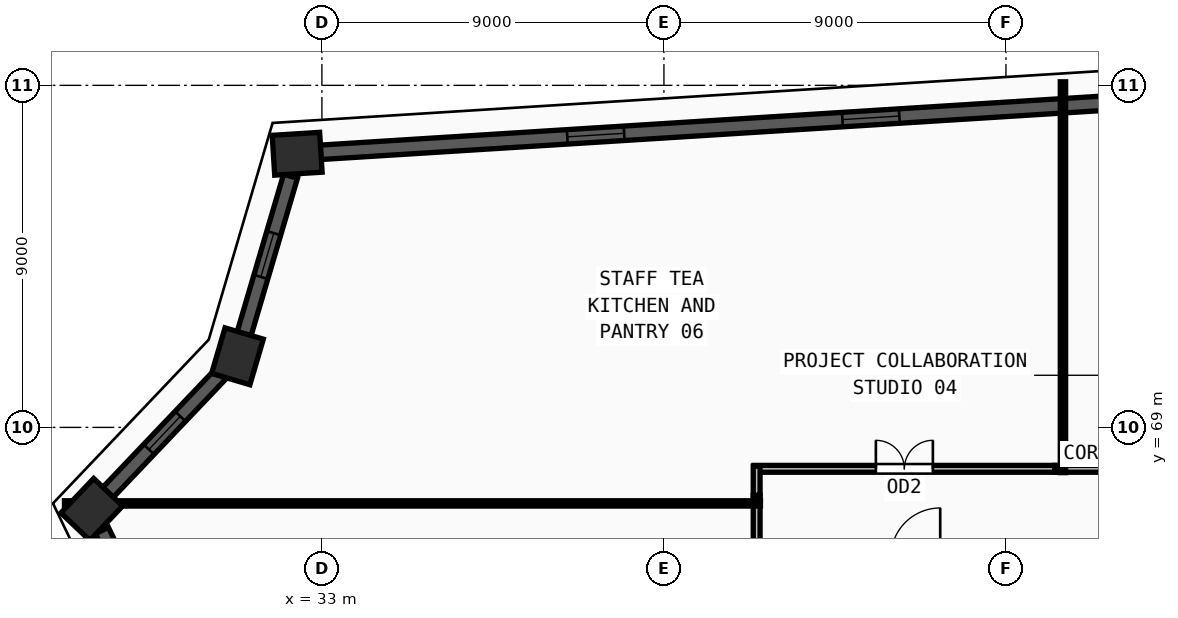
"""IFC4 building model, lengths in metres.
Left out: names, types, materials, properties, quantities, classifications, styles, units other than length and angle.
Written with IfcOpenShell. Run it as: python <this file> out.ifc"""

import sys

from ifc_helpers import new_model, si_unit, direction, frame, frame_2d, origin, origin_2d, place, context, subcontext, project, spatial, rectangle, extrude, source, transform, mapped, element, fill, save


model = new_model("IFC4")
c1 = context("Model", 3, precision=1e-05, world=origin(), true_north=direction((0.0, 1.0)))
c2 = subcontext(c1, "Body", "Model", "MODEL_VIEW")
j1 = project(units=[si_unit("LENGTHUNIT", "METRE"), si_unit("PLANEANGLEUNIT", "RADIAN")], contexts=[c1])
p1 = place(None, origin())
s1 = spatial("IfcSite", under=j1, at=p1, CompositionType="ELEMENT")
p2 = place(p1, origin())
s2 = spatial("IfcBuilding", under=s1, at=p2, CompositionType="ELEMENT")
p3 = place(p2, frame((0.0, 0.0, 224.25)))
s3 = spatial("IfcBuildingStorey", under=s2, at=p3, CompositionType="ELEMENT", Elevation=224.25)
m1 = source(origin(), c2, "Body", "SweptSolid", [
    extrude(rectangle(XDim=1.25, YDim=1.05, at=origin_2d()), origin(), (0.0, 0.0, 1.0), 3.75),
])
for number, where, z_axis, x_axis in (
    (1, (26.944, 66.841, 0.0), (0.0, 0.0, 1.0), (0.689, 0.724, 0.0)),
    (2, (30.778, 70.871, 0.0), (0.0, 0.0, 1.0), (0.283, 0.959, 0.0)),
    (3, (32.349, 76.2, 0.0), (0.0, 0.0, 1.0), (0.998, 0.062, 0.0)),
):
    element("IfcColumn", number, at=place(p3, frame(where, z_axis=z_axis, x_axis=x_axis)), inside=s3, PredefinedType="COLUMN", context=c2, shape_type="MappedRepresentation", body=[
        mapped(m1, transform((0.0, 0.0, 0.0), x_axis=(1.0, 0.0, 0.0), y_axis=(0.0, 1.0, 0.0), z_axis=(0.0, 0.0, 1.0), scale=1.0)),
    ])
p4 = place(p3, frame((61.928, 78.053, 0.0), z_axis=(0.0, 0.0, 1.0), x_axis=(-0.998042647874, -0.062536973258, 0.0)))
e4 = element("IfcWall", 4, at=p4, inside=s3, PredefinedType="SOLIDWALL", context=c2, shape_type="SweptSolid", body=[
    extrude(rectangle(XDim=29.022, YDim=0.38, at=frame_2d((14.511, 0.0))), origin(), (0.0, 0.0, 1.0), 3.57),
])
m2 = source(origin(), c2, "Body", "SweptSolid", [
    extrude(rectangle(XDim=1.5, YDim=1.9, at=frame_2d((0.75, 0.95))), frame((0.0, 0.2, 0.0), z_axis=(0.0, -1.0, 0.0), x_axis=(1.0, 0.0, 0.0)), (0.0, 0.0, 1.0), 0.4),
])
p5 = place(p4, frame((6.505, 0.0, 0.55)))
e5 = element("IfcOpeningElement", 5, at=p5, cuts=e4, PredefinedType="OPENING", context=c2, shape_type="MappedRepresentation", body=[
    mapped(m2, transform((0.0, 0.0, 0.0), x_axis=(1.0, 0.0, 0.0), y_axis=(0.0, 1.0, 0.0), z_axis=(0.0, 0.0, 1.0), scale=1.0)),
])
p6 = place(p4, frame((13.761, 0.0, 0.55)))
e6 = element("IfcOpeningElement", 6, at=p6, cuts=e4, PredefinedType="OPENING", context=c2, shape_type="MappedRepresentation", body=[
    mapped(m2, transform((0.0, 0.0, 0.0), x_axis=(1.0, 0.0, 0.0), y_axis=(0.0, 1.0, 0.0), z_axis=(0.0, 0.0, 1.0), scale=1.0)),
])
p7 = place(p4, frame((21.016, 0.0, 0.55)))
e7 = element("IfcOpeningElement", 7, at=p7, cuts=e4, PredefinedType="OPENING", context=c2, shape_type="MappedRepresentation", body=[
    mapped(m2, transform((0.0, 0.0, 0.0), x_axis=(1.0, 0.0, 0.0), y_axis=(0.0, 1.0, 0.0), z_axis=(0.0, 0.0, 1.0), scale=1.0)),
])
p8 = place(p3, frame((32.175, 75.61, 0.0), z_axis=(0.0, 0.0, 1.0), x_axis=(-0.282762120178, -0.959190066354, 0.0)))
e8 = element("IfcWall", 8, at=p8, inside=s3, PredefinedType="SOLIDWALL", context=c2, shape_type="SweptSolid", body=[
    extrude(rectangle(XDim=4.326, YDim=0.38, at=frame_2d((2.163, 0.0))), origin(), (0.0, 0.0, 1.0), 3.57),
])
m3 = source(origin(), c2, "Body", "SweptSolid", [
    extrude(rectangle(XDim=1.2, YDim=1.9, at=frame_2d((0.6, 0.95))), frame((0.0, 0.2, 0.0), z_axis=(0.0, -1.0, 0.0), x_axis=(1.0, 0.0, 0.0)), (0.0, 0.0, 1.0), 0.4),
])
p9 = place(p8, frame((1.563, 0.0, 0.55)))
e9 = element("IfcOpeningElement", 9, at=p9, cuts=e8, PredefinedType="OPENING", context=c2, shape_type="MappedRepresentation", body=[
    mapped(m3, transform((0.0, 0.0, 0.0), x_axis=(1.0, 0.0, 0.0), y_axis=(0.0, 1.0, 0.0), z_axis=(0.0, 0.0, 1.0), scale=1.0)),
])
p10 = place(p3, frame((30.354, 70.425, 0.0), z_axis=(0.0, 0.0, 1.0), x_axis=(-0.689360975367, -0.724418004774, 0.0)))
e10 = element("IfcWall", 10, at=p10, inside=s3, PredefinedType="SOLIDWALL", context=c2, shape_type="SweptSolid", body=[
    extrude(rectangle(XDim=4.332, YDim=0.38, at=frame_2d((2.166, 0.0))), origin(), (0.0, 0.0, 1.0), 3.57),
])
p11 = place(p10, frame((1.566, 0.0, 0.55)))
e11 = element("IfcOpeningElement", 11, at=p11, cuts=e10, PredefinedType="OPENING", context=c2, shape_type="MappedRepresentation", body=[
    mapped(m3, transform((0.0, 0.0, 0.0), x_axis=(1.0, 0.0, 0.0), y_axis=(0.0, 1.0, 0.0), z_axis=(0.0, 0.0, 1.0), scale=1.0)),
])
p12 = place(p3, frame((27.211, 66.287, 0.0), z_axis=(0.0, 0.0, 1.0), x_axis=(0.433730710757, -0.901042546469, 0.0)))
e12 = element("IfcWall", 12, at=p12, inside=s3, PredefinedType="SOLIDWALL", context=c2, shape_type="SweptSolid", body=[
    extrude(rectangle(XDim=23.948, YDim=0.38, at=frame_2d((11.974, 0.0))), origin(), (0.0, 0.0, 1.0), 3.57),
])
p13 = place(p12, frame((5.237, 0.0, 0.55)))
e13 = element("IfcOpeningElement", 13, at=p13, cuts=e12, PredefinedType="OPENING", context=c2, shape_type="MappedRepresentation", body=[
    mapped(m2, transform((0.0, 0.0, 0.0), x_axis=(1.0, 0.0, 0.0), y_axis=(0.0, 1.0, 0.0), z_axis=(0.0, 0.0, 1.0), scale=1.0)),
])
p14 = place(p12, frame((11.224, 0.0, 0.55)))
e14 = element("IfcOpeningElement", 14, at=p14, cuts=e12, PredefinedType="OPENING", context=c2, shape_type="MappedRepresentation", body=[
    mapped(m2, transform((0.0, 0.0, 0.0), x_axis=(1.0, 0.0, 0.0), y_axis=(0.0, 1.0, 0.0), z_axis=(0.0, 0.0, 1.0), scale=1.0)),
])
p15 = place(p12, frame((15.011, 0.0, 0.55)))
e15 = element("IfcOpeningElement", 15, at=p15, cuts=e12, PredefinedType="OPENING", context=c2, shape_type="MappedRepresentation", body=[
    mapped(m2, transform((0.0, 0.0, 0.0), x_axis=(1.0, 0.0, 0.0), y_axis=(0.0, 1.0, 0.0), z_axis=(0.0, 0.0, 1.0), scale=1.0)),
])
p16 = place(p3, frame((52.285, 67.91, 0.0), z_axis=(0.0, 0.0, 1.0), x_axis=(1.0, 0.0, 0.0)))
e16 = element("IfcWall", 16, at=p16, inside=s3, PredefinedType="PARTITIONING", context=c2, shape_type="SweptSolid", body=[
    extrude(rectangle(XDim=9.43, YDim=0.18, at=frame_2d((4.715, 0.0))), origin(), (0.0, 0.0, 1.0), 3.57),
])
m4 = source(origin(), c2, "Body", "SweptSolid", [
    extrude(rectangle(XDim=1.0, YDim=2.2, at=frame_2d((0.5, 1.1))), frame((0.0, 0.1, 0.0), z_axis=(0.0, -1.0, 0.0), x_axis=(1.0, 0.0, 0.0)), (0.0, 0.0, 1.0), 0.2),
])
p17 = place(p16, frame((4.215, 0.0, 0.0)))
e17 = element("IfcOpeningElement", 17, at=p17, cuts=e16, PredefinedType="OPENING", context=c2, shape_type="MappedRepresentation", body=[
    mapped(m4, transform((0.0, 0.0, 0.0), x_axis=(1.0, 0.0, 0.0), y_axis=(0.0, 1.0, 0.0), z_axis=(0.0, 0.0, 1.0), scale=1.0)),
])
p18 = place(p3, frame((44.37, 67.91, 0.0), z_axis=(0.0, 0.0, 1.0), x_axis=(1.0, 0.0, 0.0)))
e18 = element("IfcWall", 18, at=p18, inside=s3, PredefinedType="PARTITIONING", context=c2, shape_type="SweptSolid", body=[
    extrude(rectangle(XDim=7.915, YDim=0.18, at=frame_2d((3.958, 0.0))), origin(), (0.0, 0.0, 1.0), 3.205),
])
m5 = source(origin(), c2, "Body", "SweptSolid", [
    extrude(rectangle(XDim=1.5, YDim=2.2, at=frame_2d((0.75, 1.1))), frame((0.0, 0.1, 0.0), z_axis=(0.0, -1.0, 0.0), x_axis=(1.0, 0.0, 0.0)), (0.0, 0.0, 1.0), 0.2),
])
p19 = place(p18, frame((3.207, 0.0, 0.0)))
e19 = element("IfcOpeningElement", 19, at=p19, cuts=e18, PredefinedType="OPENING", context=c2, shape_type="MappedRepresentation", body=[
    mapped(m5, transform((0.0, 0.0, 0.0), x_axis=(1.0, 0.0, 0.0), y_axis=(0.0, 1.0, 0.0), z_axis=(0.0, 0.0, 1.0), scale=1.0)),
])
p20 = place(p3, frame((44.44, 57.285, 0.0), z_axis=(0.0, 0.0, 1.0), x_axis=(0.0, 1.0, 0.0)))
e20 = element("IfcWall", 20, at=p20, inside=s3, PredefinedType="PARTITIONING", context=c2, shape_type="SweptSolid", body=[
    extrude(rectangle(XDim=9.93, YDim=0.18, at=frame_2d((4.965, 0.0))), origin(), (0.0, 0.0, 1.0), 3.57),
])
p21 = place(p20, frame((4.215, 0.0, 0.0)))
e21 = element("IfcOpeningElement", 21, at=p21, cuts=e20, PredefinedType="OPENING", context=c2, shape_type="MappedRepresentation", body=[
    mapped(m5, transform((0.0, 0.0, 0.0), x_axis=(1.0, 0.0, 0.0), y_axis=(0.0, 1.0, 0.0), z_axis=(0.0, 0.0, 1.0), scale=1.0)),
])
p22 = place(p3, frame((44.44, 67.215, 0.0), z_axis=(0.0, 0.0, 1.0), x_axis=(0.0, 1.0, 0.0)))
e22 = element("IfcWall", 22, at=p22, inside=s3, PredefinedType="PARTITIONING", context=c2, shape_type="SweptSolid", body=[
    extrude(rectangle(XDim=0.765, YDim=0.18, at=frame_2d((0.382, 0.0))), origin(), (0.0, 0.0, 1.0), 3.57),
])
p23 = place(p3, frame((44.54, 67.0, 0.0), z_axis=(0.0, 0.0, 1.0), x_axis=(-1.0, 0.0, 0.0)))
e23 = element("IfcWall", 23, at=p23, inside=s3, PredefinedType="PARTITIONING", context=c2, shape_type="SweptSolid", body=[
    extrude(rectangle(XDim=18.314, YDim=0.14, at=frame_2d((9.157, 0.0))), origin(), (0.0, 0.0, 1.0), 3.57),
])
p24 = place(p3, frame((52.5, 67.81, 0.0), z_axis=(0.0, 0.0, 1.0), x_axis=(0.0, 1.0, 0.0)))
e24 = element("IfcWall", 24, at=p24, inside=s3, PredefinedType="PARTITIONING", context=c2, shape_type="SweptSolid", body=[
    extrude(rectangle(XDim=10.283, YDim=0.14, at=frame_2d((5.142, 0.0))), origin(), (0.0, 0.0, 1.0), 3.57),
])
m6 = source(origin(), c2, "Body", "SweptSolid", [
    extrude(rectangle(XDim=1.5, YDim=1.9, at=frame_2d((0.75, 0.95))), frame((0.0, 0.03, 0.0), z_axis=(0.0, -1.0, 0.0), x_axis=(1.0, 0.0, 0.0)), (0.0, 0.0, 1.0), 0.06),
])
p25 = place(p6, origin())
e25 = element("IfcWindow", 25, at=p25, inside=s3, PartitioningType="DOUBLE_PANEL_VERTICAL", PredefinedType="WINDOW", context=c2, shape_type="MappedRepresentation", body=[
    mapped(m6, transform((0.0, 0.0, 0.0), x_axis=(1.0, 0.0, 0.0), y_axis=(0.0, 1.0, 0.0), z_axis=(0.0, 0.0, 1.0), scale=1.0)),
])
fill(e6, e25)
p26 = place(p7, origin())
e26 = element("IfcWindow", 26, at=p26, inside=s3, PartitioningType="DOUBLE_PANEL_VERTICAL", PredefinedType="WINDOW", context=c2, shape_type="MappedRepresentation", body=[
    mapped(m6, transform((0.0, 0.0, 0.0), x_axis=(1.0, 0.0, 0.0), y_axis=(0.0, 1.0, 0.0), z_axis=(0.0, 0.0, 1.0), scale=1.0)),
])
fill(e7, e26)
m7 = source(origin(), c2, "Body", "SweptSolid", [
    extrude(rectangle(XDim=1.2, YDim=1.9, at=frame_2d((0.6, 0.95))), frame((0.0, 0.03, 0.0), z_axis=(0.0, -1.0, 0.0), x_axis=(1.0, 0.0, 0.0)), (0.0, 0.0, 1.0), 0.06),
])
p27 = place(p9, origin())
e27 = element("IfcWindow", 27, at=p27, inside=s3, PartitioningType="SINGLE_PANEL", PredefinedType="WINDOW", context=c2, shape_type="MappedRepresentation", body=[
    mapped(m7, transform((0.0, 0.0, 0.0), x_axis=(1.0, 0.0, 0.0), y_axis=(0.0, 1.0, 0.0), z_axis=(0.0, 0.0, 1.0), scale=1.0)),
])
fill(e9, e27)
p28 = place(p11, origin())
e28 = element("IfcWindow", 28, at=p28, inside=s3, PartitioningType="SINGLE_PANEL", PredefinedType="WINDOW", context=c2, shape_type="MappedRepresentation", body=[
    mapped(m7, transform((0.0, 0.0, 0.0), x_axis=(1.0, 0.0, 0.0), y_axis=(0.0, 1.0, 0.0), z_axis=(0.0, 0.0, 1.0), scale=1.0)),
])
fill(e11, e28)
m8 = source(origin(), c2, "Body", "SweptSolid", [
    extrude(rectangle(XDim=1.5, YDim=2.2, at=frame_2d((0.75, 1.1))), frame((0.0, 0.025, 0.0), z_axis=(0.0, -1.0, 0.0), x_axis=(1.0, 0.0, 0.0)), (0.0, 0.0, 1.0), 0.05),
])
p29 = place(p19, origin())
e29 = element("IfcDoor", 29, at=p29, inside=s3, OperationType="DOUBLE_DOOR_SINGLE_SWING", PredefinedType="DOOR", context=c2, shape_type="MappedRepresentation", body=[
    mapped(m8, transform((0.0, 0.0, 0.0), x_axis=(1.0, 0.0, 0.0), y_axis=(0.0, 1.0, 0.0), z_axis=(0.0, 0.0, 1.0), scale=1.0)),
])
fill(e19, e29)
save(model, sys.argv[1])
